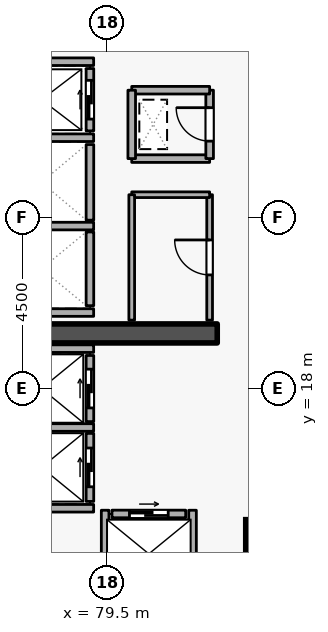
"""IFC4 building model, lengths in metres.
Left out: names, types, materials, properties, quantities, classifications, styles, units other than length and angle.
Written with IfcOpenShell. Run it as: python <this file> out.ifc"""

import sys

from ifc_helpers import new_model, si_unit, direction, frame, frame_2d, origin, origin_2d, place, context, subcontext, project, spatial, rectangle, extrude, element, fill, save


model = new_model("IFC4")
c1 = context("Model", 3, precision=1e-05, world=origin(), true_north=direction((0.0, 1.0)))
c2 = subcontext(c1, "Body", "Model", "MODEL_VIEW")
j1 = project(units=[si_unit("LENGTHUNIT", "METRE"), si_unit("PLANEANGLEUNIT", "RADIAN")], contexts=[c1])
p1 = place(None, origin())
s1 = spatial("IfcSite", under=j1, at=p1, CompositionType="ELEMENT")
p2 = place(p1, origin())
s2 = spatial("IfcBuilding", under=s1, at=p2, CompositionType="ELEMENT")
p3 = place(p2, frame((0.0, 0.0, 145.5)))
s3 = spatial("IfcBuildingStorey", under=s2, at=p3, CompositionType="ELEMENT", Elevation=145.5)
p4 = place(p3, frame((76.6, 19.45, 0.0), z_axis=(0.0, 0.0, 1.0), x_axis=(1.0, 0.0, 0.0)))
e1 = element("IfcWall", 1, at=p4, inside=s3, PredefinedType="SHEAR", context=c2, shape_type="SweptSolid", body=[
    extrude(rectangle(XDim=5.8, YDim=0.5, at=frame_2d((2.9, 0.0))), origin(), (0.0, 0.0, 1.0), 3.6),
])
p5 = place(p3, frame((83.7, 14.0, 0.0), z_axis=(0.0, 0.0, 1.0), x_axis=(1.0, 0.0, 0.0)))
e2 = element("IfcColumn", 2, at=p5, inside=s3, PredefinedType="COLUMN", context=c2, shape_type="SweptSolid", body=[
    extrude(rectangle(XDim=1.1, YDim=1.1, at=origin_2d()), origin(), (0.0, 0.0, 1.0), 3.6),
])
p6 = place(p3, frame((79.05, 24.78, 0.0), z_axis=(0.0, 0.0, 1.0), x_axis=(0.0, 1.0, 0.0)))
e3 = element("IfcWall", 3, at=p6, inside=s3, PredefinedType="STANDARD", context=c2, shape_type="SweptSolid", body=[
    extrude(rectangle(XDim=1.64, YDim=0.2, at=frame_2d((0.82, 0.0))), origin(), (0.0, 0.0, 1.0), 3.3),
])
p7 = place(p6, frame((0.31, 0.0, 0.0)))
e4 = element("IfcOpeningElement", 4, at=p7, cuts=e3, PredefinedType="OPENING", context=c2, shape_type="SweptSolid", body=[
    extrude(rectangle(XDim=1.02, YDim=2.06, at=frame_2d((0.51, 1.03))), frame((0.0, 0.11, 0.0), z_axis=(0.0, -1.0, 0.0), x_axis=(1.0, 0.0, 0.0)), (0.0, 0.0, 1.0), 0.22),
])
p8 = place(p3, frame((79.05, 22.43, 0.0), z_axis=(0.0, 0.0, 1.0), x_axis=(0.0, 1.0, 0.0)))
e5 = element("IfcWall", 5, at=p8, inside=s3, PredefinedType="STANDARD", context=c2, shape_type="SweptSolid", body=[
    extrude(rectangle(XDim=1.99, YDim=0.2, at=frame_2d((0.995, 0.0))), origin(), (0.0, 0.0, 1.0), 3.3),
])
p9 = place(p3, frame((79.05, 20.18, 0.0), z_axis=(0.0, 0.0, 1.0), x_axis=(0.0, 1.0, 0.0)))
e6 = element("IfcWall", 6, at=p9, inside=s3, PredefinedType="STANDARD", context=c2, shape_type="SweptSolid", body=[
    extrude(rectangle(XDim=1.94, YDim=0.2, at=frame_2d((0.97, 0.0))), origin(), (0.0, 0.0, 1.0), 3.3),
])
p10 = place(p3, frame((79.05, 17.13, 0.0), z_axis=(0.0, 0.0, 1.0), x_axis=(0.0, 1.0, 0.0)))
e7 = element("IfcWall", 7, at=p10, inside=s3, PredefinedType="STANDARD", context=c2, shape_type="SweptSolid", body=[
    extrude(rectangle(XDim=1.74, YDim=0.2, at=frame_2d((0.87, 0.0))), origin(), (0.0, 0.0, 1.0), 3.3),
])
p11 = place(p10, frame((0.36, 0.0, 0.0)))
e8 = element("IfcOpeningElement", 8, at=p11, cuts=e7, PredefinedType="OPENING", context=c2, shape_type="SweptSolid", body=[
    extrude(rectangle(XDim=1.02, YDim=2.06, at=frame_2d((0.51, 1.03))), frame((0.0, 0.11, 0.0), z_axis=(0.0, -1.0, 0.0), x_axis=(1.0, 0.0, 0.0)), (0.0, 0.0, 1.0), 0.22),
])
p12 = place(p3, frame((79.05, 15.03, 0.0), z_axis=(0.0, 0.0, 1.0), x_axis=(0.0, 1.0, 0.0)))
e9 = element("IfcWall", 9, at=p12, inside=s3, PredefinedType="STANDARD", context=c2, shape_type="SweptSolid", body=[
    extrude(rectangle(XDim=1.79, YDim=0.2, at=frame_2d((0.895, 0.0))), origin(), (0.0, 0.0, 1.0), 3.3),
])
p13 = place(p12, frame((0.385, 0.0, 0.0)))
e10 = element("IfcOpeningElement", 10, at=p13, cuts=e9, PredefinedType="OPENING", context=c2, shape_type="SweptSolid", body=[
    extrude(rectangle(XDim=1.02, YDim=2.06, at=frame_2d((0.51, 1.03))), frame((0.0, 0.11, 0.0), z_axis=(0.0, -1.0, 0.0), x_axis=(1.0, 0.0, 0.0)), (0.0, 0.0, 1.0), 0.22),
])
p14 = place(p3, frame((79.63, 14.7, 0.0), z_axis=(0.0, 0.0, 1.0), x_axis=(1.0, 0.0, 0.0)))
e11 = element("IfcWall", 11, at=p14, inside=s3, PredefinedType="STANDARD", context=c2, shape_type="SweptSolid", body=[
    extrude(rectangle(XDim=1.94, YDim=0.2, at=frame_2d((0.97, 0.0))), origin(), (0.0, 0.0, 1.0), 3.3),
])
p15 = place(p14, frame((0.46, 0.0, 0.0)))
e12 = element("IfcOpeningElement", 12, at=p15, cuts=e11, PredefinedType="OPENING", context=c2, shape_type="SweptSolid", body=[
    extrude(rectangle(XDim=1.02, YDim=2.06, at=frame_2d((0.51, 1.03))), frame((0.0, 0.11, 0.0), z_axis=(0.0, -1.0, 0.0), x_axis=(1.0, 0.0, 0.0)), (0.0, 0.0, 1.0), 0.22),
])
for number, where, z_axis, x_axis in (
    (13, (76.612, 26.6, 0.0), (0.0, 0.0, 1.0), (1.0, 0.0, 0.0)),
    (14, (76.612, 24.6, 0.0), (0.0, 0.0, 1.0), (1.0, 0.0, 0.0)),
    (15, (76.612, 22.275, 0.0), (0.0, 0.0, 1.0), (1.0, 0.0, 0.0)),
    (16, (76.612, 20.0, 0.0), (0.0, 0.0, 1.0), (1.0, 0.0, 0.0)),
):
    element("IfcWall", number, at=place(p3, frame(where, z_axis=z_axis, x_axis=x_axis)), inside=s3, PredefinedType="STANDARD", context=c2, shape_type="SweptSolid", body=[
        extrude(rectangle(XDim=2.536, YDim=0.2, at=frame_2d((1.268, 0.0))), origin(), (0.0, 0.0, 1.0), 3.3),
    ])
p16 = place(p3, frame((76.402, 19.05, 0.0), z_axis=(0.0, 0.0, 1.0), x_axis=(1.0, 0.0, 0.0)))
e17 = element("IfcWall", 17, at=p16, inside=s3, PredefinedType="STANDARD", context=c2, shape_type="SweptSolid", body=[
    extrude(rectangle(XDim=2.746, YDim=0.2, at=frame_2d((1.373, 0.0))), origin(), (0.0, 0.0, 1.0), 2.505),
])
p17 = place(p3, frame((76.402, 16.975, 0.0), z_axis=(0.0, 0.0, 1.0), x_axis=(1.0, 0.0, 0.0)))
e18 = element("IfcWall", 18, at=p17, inside=s3, PredefinedType="STANDARD", context=c2, shape_type="SweptSolid", body=[
    extrude(rectangle(XDim=2.746, YDim=0.2, at=frame_2d((1.373, 0.0))), origin(), (0.0, 0.0, 1.0), 3.3),
])
p18 = place(p3, frame((76.512, 14.85, 0.0), z_axis=(0.0, 0.0, 1.0), x_axis=(1.0, 0.0, 0.0)))
e19 = element("IfcWall", 19, at=p18, inside=s3, PredefinedType="STANDARD", context=c2, shape_type="SweptSolid", body=[
    extrude(rectangle(XDim=2.636, YDim=0.2, at=frame_2d((1.318, 0.0))), origin(), (0.0, 0.0, 1.0), 3.3),
])
for number, where, z_axis, x_axis in (
    (20, (81.75, 12.612, 0.0), (0.0, 0.0, 1.0), (0.0, 1.0, 0.0)),
    (21, (79.45, 12.612, 0.0), (0.0, 0.0, 1.0), (0.0, 1.0, 0.0)),
):
    element("IfcWall", number, at=place(p3, frame(where, z_axis=z_axis, x_axis=x_axis)), inside=s3, PredefinedType="STANDARD", context=c2, shape_type="SweptSolid", body=[
        extrude(rectangle(XDim=2.186, YDim=0.2, at=frame_2d((1.093, 0.0))), origin(), (0.0, 0.0, 1.0), 3.3),
    ])
p19 = place(p3, frame((80.15, 24.05, 0.0), z_axis=(0.0, 0.0, 1.0), x_axis=(1.0, 0.0, 0.0)))
e22 = element("IfcWall", 22, at=p19, inside=s3, PredefinedType="STANDARD", context=c2, shape_type="SweptSolid", body=[
    extrude(rectangle(XDim=2.05, YDim=0.2, at=frame_2d((1.025, 0.0))), origin(), (0.0, 0.0, 1.0), 3.3),
])
p20 = place(p3, frame((82.2, 24.05, 0.0), z_axis=(0.0, 0.0, 1.0), x_axis=(0.0, 1.0, 0.0)))
e23 = element("IfcWall", 23, at=p20, inside=s3, PredefinedType="STANDARD", context=c2, shape_type="SweptSolid", body=[
    extrude(rectangle(XDim=1.8, YDim=0.2, at=frame_2d((0.9, 0.0))), origin(), (0.0, 0.0, 1.0), 3.3),
])
p21 = place(p20, frame((0.46, 0.0, 0.0)))
e24 = element("IfcOpeningElement", 24, at=p21, cuts=e23, PredefinedType="OPENING", context=c2, shape_type="SweptSolid", body=[
    extrude(rectangle(XDim=0.88, YDim=2.04, at=frame_2d((0.44, 1.02))), frame((0.0, 0.11, 0.0), z_axis=(0.0, -1.0, 0.0), x_axis=(1.0, 0.0, 0.0)), (0.0, 0.0, 1.0), 0.22),
])
p22 = place(p3, frame((82.2, 25.85, 0.0), z_axis=(0.0, 0.0, 1.0), x_axis=(-1.0, 0.0, 0.0)))
e25 = element("IfcWall", 25, at=p22, inside=s3, PredefinedType="STANDARD", context=c2, shape_type="SweptSolid", body=[
    extrude(rectangle(XDim=2.05, YDim=0.2, at=frame_2d((1.025, 0.0))), origin(), (0.0, 0.0, 1.0), 3.3),
])
p23 = place(p3, frame((80.15, 25.85, 0.0), z_axis=(0.0, 0.0, 1.0), x_axis=(0.0, -1.0, 0.0)))
e26 = element("IfcWall", 26, at=p23, inside=s3, PredefinedType="STANDARD", context=c2, shape_type="SweptSolid", body=[
    extrude(rectangle(XDim=1.8, YDim=0.2, at=frame_2d((0.9, 0.0))), origin(), (0.0, 0.0, 1.0), 3.3),
])
p24 = place(p3, frame((82.2, 19.8, 0.0), z_axis=(0.0, 0.0, 1.0), x_axis=(0.0, 1.0, 0.0)))
e27 = element("IfcWall", 27, at=p24, inside=s3, PredefinedType="PARTITIONING", context=c2, shape_type="SweptSolid", body=[
    extrude(rectangle(XDim=3.3, YDim=0.15, at=frame_2d((1.65, 0.0))), origin(), (0.0, 0.0, 1.0), 3.3),
])
p25 = place(p24, frame((1.19, 0.0, 0.0)))
e28 = element("IfcOpeningElement", 28, at=p25, cuts=e27, PredefinedType="OPENING", context=c2, shape_type="SweptSolid", body=[
    extrude(rectangle(XDim=0.92, YDim=2.08, at=frame_2d((0.46, 1.04))), frame((0.0, 0.085, 0.0), z_axis=(0.0, -1.0, 0.0), x_axis=(1.0, 0.0, 0.0)), (0.0, 0.0, 1.0), 0.17),
])
p26 = place(p3, frame((82.2, 23.1, 0.0), z_axis=(0.0, 0.0, 1.0), x_axis=(-1.0, 0.0, 0.0)))
e29 = element("IfcWall", 29, at=p26, inside=s3, PredefinedType="PARTITIONING", context=c2, shape_type="SweptSolid", body=[
    extrude(rectangle(XDim=2.05, YDim=0.15, at=frame_2d((1.025, 0.0))), origin(), (0.0, 0.0, 1.0), 3.3),
])
p27 = place(p3, frame((80.15, 23.1, 0.0), z_axis=(0.0, 0.0, 1.0), x_axis=(0.0, -1.0, 0.0)))
e30 = element("IfcWall", 30, at=p27, inside=s3, PredefinedType="PARTITIONING", context=c2, shape_type="SweptSolid", body=[
    extrude(rectangle(XDim=3.3, YDim=0.15, at=frame_2d((1.65, 0.0))), origin(), (0.0, 0.0, 1.0), 3.3),
])
p28 = place(p7, origin())
e31 = element("IfcDoor", 31, at=p28, inside=s3, OperationType="SLIDING_TO_LEFT", PredefinedType="DOOR", context=c2, shape_type="SweptSolid", body=[
    extrude(rectangle(XDim=1.02, YDim=2.06, at=frame_2d((0.51, 1.03))), frame((0.0, 0.025, 0.0), z_axis=(0.0, -1.0, 0.0), x_axis=(1.0, 0.0, 0.0)), (0.0, 0.0, 1.0), 0.05),
])
fill(e4, e31)
p29 = place(p11, origin())
e32 = element("IfcDoor", 32, at=p29, inside=s3, OperationType="SLIDING_TO_LEFT", PredefinedType="DOOR", context=c2, shape_type="SweptSolid", body=[
    extrude(rectangle(XDim=1.02, YDim=2.06, at=frame_2d((0.51, 1.03))), frame((0.0, 0.025, 0.0), z_axis=(0.0, -1.0, 0.0), x_axis=(1.0, 0.0, 0.0)), (0.0, 0.0, 1.0), 0.05),
])
fill(e8, e32)
p30 = place(p13, origin())
e33 = element("IfcDoor", 33, at=p30, inside=s3, OperationType="SLIDING_TO_LEFT", PredefinedType="DOOR", context=c2, shape_type="SweptSolid", body=[
    extrude(rectangle(XDim=1.02, YDim=2.06, at=frame_2d((0.51, 1.03))), frame((0.0, 0.025, 0.0), z_axis=(0.0, -1.0, 0.0), x_axis=(1.0, 0.0, 0.0)), (0.0, 0.0, 1.0), 0.05),
])
fill(e10, e33)
p31 = place(p15, origin())
e34 = element("IfcDoor", 34, at=p31, inside=s3, OperationType="SLIDING_TO_LEFT", PredefinedType="DOOR", context=c2, shape_type="SweptSolid", body=[
    extrude(rectangle(XDim=1.02, YDim=2.06, at=frame_2d((0.51, 1.03))), frame((0.0, 0.025, 0.0), z_axis=(0.0, -1.0, 0.0), x_axis=(1.0, 0.0, 0.0)), (0.0, 0.0, 1.0), 0.05),
])
fill(e12, e34)
p32 = place(p21, origin())
e35 = element("IfcDoor", 35, at=p32, inside=s3, OperationType="SINGLE_SWING_RIGHT", PredefinedType="DOOR", context=c2, shape_type="SweptSolid", body=[
    extrude(rectangle(XDim=0.88, YDim=2.04, at=frame_2d((0.44, 1.02))), frame((0.0, 0.025, 0.0), z_axis=(0.0, -1.0, 0.0), x_axis=(1.0, 0.0, 0.0)), (0.0, 0.0, 1.0), 0.05),
])
fill(e24, e35)
p33 = place(p25, origin())
e36 = element("IfcDoor", 36, at=p33, inside=s3, OperationType="SINGLE_SWING_RIGHT", PredefinedType="DOOR", context=c2, shape_type="SweptSolid", body=[
    extrude(rectangle(XDim=0.92, YDim=2.08, at=frame_2d((0.46, 1.04))), frame((0.0, 0.025, 0.0), z_axis=(0.0, -1.0, 0.0), x_axis=(1.0, 0.0, 0.0)), (0.0, 0.0, 1.0), 0.05),
])
fill(e28, e36)
save(model, sys.argv[1])
